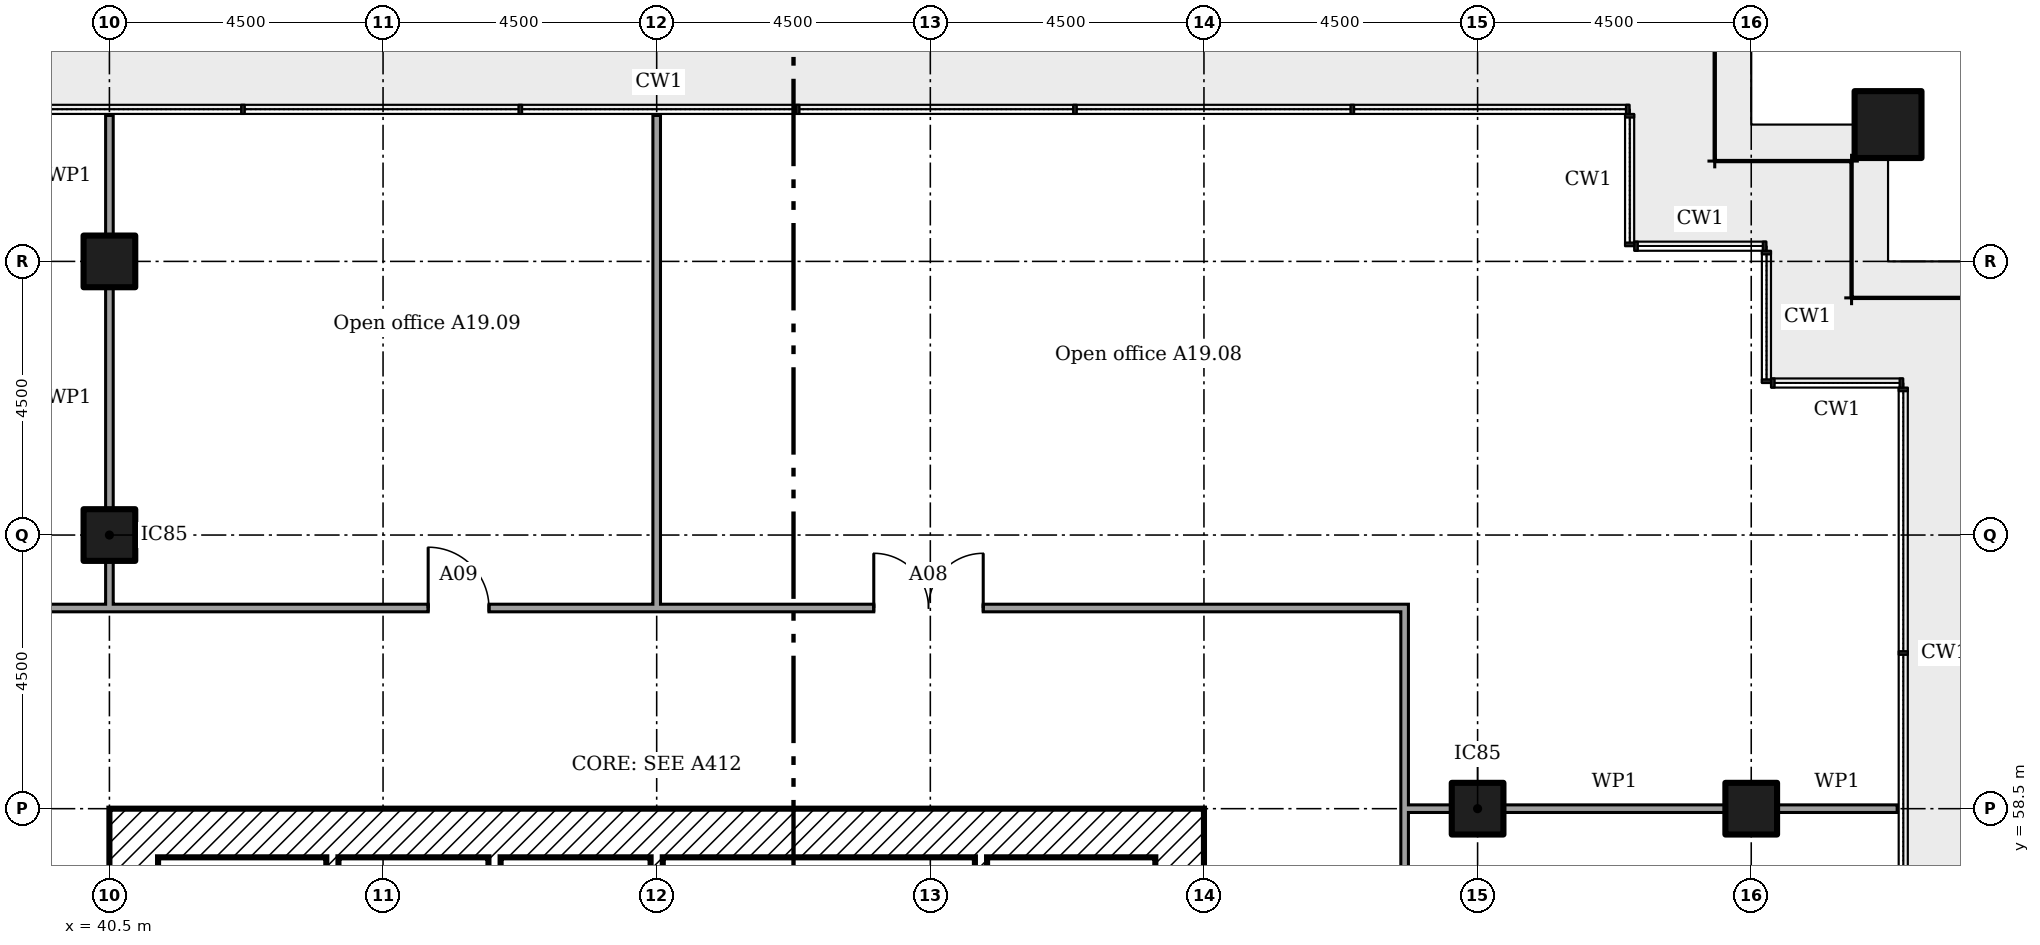
"""IFC4 building model, lengths in metres.
Left out: names, types, materials, properties, quantities, classifications, styles, units other than length and angle.
Written with IfcOpenShell. Run it as: python <this file> out.ifc"""

import sys

from ifc_helpers import new_model, si_unit, direction, frame, frame_2d, origin, origin_2d, place, context, subcontext, project, spatial, rectangle, extrude, element, fill, save


model = new_model("IFC4")
c1 = context("Model", 3, precision=1e-05, world=origin(), true_north=direction((0.0, 1.0)))
c2 = subcontext(c1, "Body", "Model", "MODEL_VIEW")
j1 = project(units=[si_unit("LENGTHUNIT", "METRE"), si_unit("PLANEANGLEUNIT", "RADIAN")], contexts=[c1])
p1 = place(None, origin())
s1 = spatial("IfcSite", under=j1, at=p1, CompositionType="ELEMENT")
p2 = place(p1, origin())
s2 = spatial("IfcBuilding", under=s1, at=p2, CompositionType="ELEMENT")
p3 = place(p2, frame((0.0, 0.0, 79.8)))
s3 = spatial("IfcBuildingStorey", under=s2, at=p3, CompositionType="ELEMENT", Elevation=79.8)
p4 = place(p3, frame((69.75, 69.75, 0.0)))
e1 = element("IfcColumn", 1, at=p4, inside=s3, PredefinedType="COLUMN", context=c2, shape_type="SweptSolid", body=[
    extrude(rectangle(XDim=1.1, YDim=1.1, at=origin_2d()), origin(), (0.0, 0.0, 1.0), 3.6),
])
for number, where in (
    (2, (40.5, 63.0, 0.0)),
    (3, (40.5, 67.5, 0.0)),
    (4, (63.0, 58.5, 0.0)),
    (5, (67.5, 58.5, 0.0)),
):
    element("IfcColumn", number, at=place(p3, frame(where)), inside=s3, PredefinedType="COLUMN", context=c2, shape_type="SweptSolid", body=[
        extrude(rectangle(XDim=0.85, YDim=0.85, at=origin_2d()), origin(), (0.0, 0.0, 1.0), 3.6),
    ])
p5 = place(p3, frame((58.1, 40.5, 0.0), z_axis=(0.0, 0.0, 1.0), x_axis=(0.0, 1.0, 0.0)))
e6 = element("IfcWall", 6, at=p5, inside=s3, PredefinedType="SHEAR", context=c2, shape_type="SweptSolid", body=[
    extrude(rectangle(XDim=18.0, YDim=0.8, at=frame_2d((9.0, 0.0))), origin(), (0.0, 0.0, 1.0), 3.35),
])
p6 = place(p5, frame((13.15, 0.0, 0.0)))
e7 = element("IfcOpeningElement", 7, at=p6, cuts=e6, PredefinedType="OPENING", context=c2, shape_type="SweptSolid", body=[
    extrude(rectangle(XDim=1.2, YDim=2.1, at=frame_2d((0.6, 1.05))), frame((0.0, 0.41, 0.0), z_axis=(0.0, -1.0, 0.0), x_axis=(1.0, 0.0, 0.0)), (0.0, 0.0, 1.0), 0.82),
])
p7 = place(p5, frame((3.9, 0.0, 0.0)))
e8 = element("IfcOpeningElement", 8, at=p7, cuts=e6, PredefinedType="OPENING", context=c2, shape_type="SweptSolid", body=[
    extrude(rectangle(XDim=1.8, YDim=2.1, at=frame_2d((0.9, 1.05))), frame((0.0, 0.41, 0.0), z_axis=(0.0, -1.0, 0.0), x_axis=(1.0, 0.0, 0.0)), (0.0, 0.0, 1.0), 0.82),
])
p8 = place(p5, frame((11.525, 0.0, 0.0)))
e9 = element("IfcOpeningElement", 9, at=p8, cuts=e6, PredefinedType="OPENING", context=c2, shape_type="SweptSolid", body=[
    extrude(rectangle(XDim=1.0, YDim=2.1, at=frame_2d((0.5, 1.05))), frame((0.0, 0.41, 0.0), z_axis=(0.0, -1.0, 0.0), x_axis=(1.0, 0.0, 0.0)), (0.0, 0.0, 1.0), 0.82),
])
p9 = place(p3, frame((41.3, 58.1, 0.0)))
e10 = element("IfcWall", 10, at=p9, inside=s3, PredefinedType="SHEAR", context=c2, shape_type="SweptSolid", body=[
    extrude(rectangle(XDim=16.4, YDim=0.8, at=frame_2d((8.2, 0.0))), origin(), (0.0, 0.0, 1.0), 3.35),
])
p10 = place(p3, frame((40.9, 40.5, 0.0), z_axis=(0.0, 0.0, 1.0), x_axis=(0.0, 1.0, 0.0)))
e11 = element("IfcWall", 11, at=p10, inside=s3, PredefinedType="SHEAR", context=c2, shape_type="SweptSolid", body=[
    extrude(rectangle(XDim=18.0, YDim=0.8, at=frame_2d((9.0, 0.0))), origin(), (0.0, 0.0, 1.0), 3.35),
])
p11 = place(p10, frame((3.65, 0.0, 0.0)))
e12 = element("IfcOpeningElement", 12, at=p11, cuts=e11, PredefinedType="OPENING", context=c2, shape_type="SweptSolid", body=[
    extrude(rectangle(XDim=1.2, YDim=2.1, at=frame_2d((0.6, 1.05))), frame((0.0, 0.41, 0.0), z_axis=(0.0, -1.0, 0.0), x_axis=(1.0, 0.0, 0.0)), (0.0, 0.0, 1.0), 0.82),
])
p12 = place(p10, frame((5.475, 0.0, 0.0)))
e13 = element("IfcOpeningElement", 13, at=p12, cuts=e11, PredefinedType="OPENING", context=c2, shape_type="SweptSolid", body=[
    extrude(rectangle(XDim=1.0, YDim=2.1, at=frame_2d((0.5, 1.05))), frame((0.0, 0.41, 0.0), z_axis=(0.0, -1.0, 0.0), x_axis=(1.0, 0.0, 0.0)), (0.0, 0.0, 1.0), 0.82),
])
p13 = place(p10, frame((12.3, 0.0, 0.0)))
e14 = element("IfcOpeningElement", 14, at=p13, cuts=e11, PredefinedType="OPENING", context=c2, shape_type="SweptSolid", body=[
    extrude(rectangle(XDim=1.0, YDim=2.1, at=frame_2d((0.5, 1.05))), frame((0.0, 0.41, 0.0), z_axis=(0.0, -1.0, 0.0), x_axis=(1.0, 0.0, 0.0)), (0.0, 0.0, 1.0), 0.82),
])
p14 = place(p3, frame((44.167, 57.7, 0.0), z_axis=(0.0, 0.0, 1.0), x_axis=(0.0, -1.0, 0.0)))
e15 = element("IfcWall", 15, at=p14, inside=s3, PredefinedType="SHEAR", context=c2, shape_type="SweptSolid", body=[
    extrude(rectangle(XDim=3.3, YDim=0.2, at=frame_2d((1.65, 0.0))), origin(), (0.0, 0.0, 1.0), 3.35),
])
p15 = place(p3, frame((46.833, 57.7, 0.0), z_axis=(0.0, 0.0, 1.0), x_axis=(0.0, -1.0, 0.0)))
e16 = element("IfcWall", 16, at=p15, inside=s3, PredefinedType="SHEAR", context=c2, shape_type="SweptSolid", body=[
    extrude(rectangle(XDim=4.4, YDim=0.2, at=frame_2d((2.2, 0.0))), origin(), (0.0, 0.0, 1.0), 3.35),
])
for number, where, z_axis, x_axis in (
    (17, (49.5, 57.7, 0.0), (0.0, 0.0, 1.0), (0.0, -1.0, 0.0)),
    (18, (54.833, 57.7, 0.0), (0.0, 0.0, 1.0), (0.0, -1.0, 0.0)),
):
    element("IfcWall", number, at=place(p3, frame(where, z_axis=z_axis, x_axis=x_axis)), inside=s3, PredefinedType="SHEAR", context=c2, shape_type="SweptSolid", body=[
        extrude(rectangle(XDim=2.5, YDim=0.2, at=frame_2d((1.25, 0.0))), origin(), (0.0, 0.0, 1.0), 3.35),
    ])
p16 = place(p3, frame((61.8, 58.5, 0.0)))
e19 = element("IfcWall", 19, at=p16, inside=s3, PredefinedType="PARTITIONING", context=c2, shape_type="SweptSolid", body=[
    extrude(rectangle(XDim=0.775, YDim=0.125, at=frame_2d((0.387, 0.0))), origin(), (0.0, 0.0, 1.0), 2.676),
])
p17 = place(p3, frame((63.425, 58.5, 0.0)))
e20 = element("IfcWall", 20, at=p17, inside=s3, PredefinedType="PARTITIONING", context=c2, shape_type="SweptSolid", body=[
    extrude(rectangle(XDim=3.65, YDim=0.125, at=frame_2d((1.825, 0.0))), origin(), (0.0, 0.0, 1.0), 2.676),
])
p18 = place(p3, frame((67.925, 58.5, 0.0)))
e21 = element("IfcWall", 21, at=p18, inside=s3, PredefinedType="PARTITIONING", context=c2, shape_type="SweptSolid", body=[
    extrude(rectangle(XDim=1.975, YDim=0.125, at=frame_2d((0.987, 0.0))), origin(), (0.0, 0.0, 1.0), 2.676),
])
p19 = place(p3, frame((38.637, 61.8, 0.0)))
e22 = element("IfcWall", 22, at=p19, inside=s3, PredefinedType="PARTITIONING", context=c2, shape_type="SweptSolid", body=[
    extrude(rectangle(XDim=23.225, YDim=0.125, at=frame_2d((11.613, 0.0))), origin(), (0.0, 0.0, 1.0), 3.45),
])
p20 = place(p19, frame((14.433, 0.0, 0.0)))
e23 = element("IfcOpeningElement", 23, at=p20, cuts=e22, PredefinedType="OPENING", context=c2, shape_type="SweptSolid", body=[
    extrude(rectangle(XDim=1.8, YDim=2.1, at=frame_2d((0.9, 1.05))), frame((0.0, 0.073, 0.0), z_axis=(0.0, -1.0, 0.0), x_axis=(1.0, 0.0, 0.0)), (0.0, 0.0, 1.0), 0.145),
])
p21 = place(p19, frame((7.104, 0.0, 0.0)))
e24 = element("IfcOpeningElement", 24, at=p21, cuts=e22, PredefinedType="OPENING", context=c2, shape_type="SweptSolid", body=[
    extrude(rectangle(XDim=1.0, YDim=2.1, at=frame_2d((0.5, 1.05))), frame((0.0, 0.073, 0.0), z_axis=(0.0, -1.0, 0.0), x_axis=(1.0, 0.0, 0.0)), (0.0, 0.0, 1.0), 0.145),
])
p22 = place(p3, frame((40.5, 61.8, 0.0), z_axis=(0.0, 0.0, 1.0), x_axis=(0.0, 1.0, 0.0)))
e25 = element("IfcWall", 25, at=p22, inside=s3, PredefinedType="PARTITIONING", context=c2, shape_type="SweptSolid", body=[
    extrude(rectangle(XDim=0.775, YDim=0.125, at=frame_2d((0.387, 0.0))), origin(), (0.0, 0.0, 1.0), 2.676),
])
p23 = place(p3, frame((40.5, 63.425, 0.0), z_axis=(0.0, 0.0, 1.0), x_axis=(0.0, 1.0, 0.0)))
e26 = element("IfcWall", 26, at=p23, inside=s3, PredefinedType="PARTITIONING", context=c2, shape_type="SweptSolid", body=[
    extrude(rectangle(XDim=3.65, YDim=0.125, at=frame_2d((1.825, 0.0))), origin(), (0.0, 0.0, 1.0), 2.676),
])
p24 = place(p3, frame((40.5, 67.925, 0.0), z_axis=(0.0, 0.0, 1.0), x_axis=(0.0, 1.0, 0.0)))
e27 = element("IfcWall", 27, at=p24, inside=s3, PredefinedType="PARTITIONING", context=c2, shape_type="SweptSolid", body=[
    extrude(rectangle(XDim=1.975, YDim=0.125, at=frame_2d((0.987, 0.0))), origin(), (0.0, 0.0, 1.0), 2.676),
])
p25 = place(p3, frame((49.5, 61.8, 0.0), z_axis=(0.0, 0.0, 1.0), x_axis=(0.0, 1.0, 0.0)))
e28 = element("IfcWall", 28, at=p25, inside=s3, PredefinedType="PARTITIONING", context=c2, shape_type="SweptSolid", body=[
    extrude(rectangle(XDim=8.1, YDim=0.125, at=frame_2d((4.05, 0.0))), origin(), (0.0, 0.0, 1.0), 2.766),
])
p26 = place(p3, frame((61.8, 37.262, 0.0), z_axis=(0.0, 0.0, 1.0), x_axis=(0.0, 1.0, 0.0)))
e29 = element("IfcWall", 29, at=p26, inside=s3, PredefinedType="PARTITIONING", context=c2, shape_type="SweptSolid", body=[
    extrude(rectangle(XDim=24.475, YDim=0.125, at=frame_2d((12.238, 0.0))), origin(), (0.0, 0.0, 1.0), 3.45),
])
p27 = place(p26, frame((4.532, 0.0, 0.0)))
e30 = element("IfcOpeningElement", 30, at=p27, cuts=e29, PredefinedType="OPENING", context=c2, shape_type="SweptSolid", body=[
    extrude(rectangle(XDim=1.0, YDim=2.1, at=frame_2d((0.5, 1.05))), frame((0.0, 0.073, 0.0), z_axis=(0.0, -1.0, 0.0), x_axis=(1.0, 0.0, 0.0)), (0.0, 0.0, 1.0), 0.145),
])
p28 = place(p26, frame((12.979, 0.0, 0.0)))
e31 = element("IfcOpeningElement", 31, at=p28, cuts=e29, PredefinedType="OPENING", context=c2, shape_type="SweptSolid", body=[
    extrude(rectangle(XDim=1.0, YDim=2.1, at=frame_2d((0.5, 1.05))), frame((0.0, 0.073, 0.0), z_axis=(0.0, -1.0, 0.0), x_axis=(1.0, 0.0, 0.0)), (0.0, 0.0, 1.0), 0.145),
])
p29 = place(p26, frame((18.488, 0.0, 0.0)))
e32 = element("IfcOpeningElement", 32, at=p29, cuts=e29, PredefinedType="OPENING", context=c2, shape_type="SweptSolid", body=[
    extrude(rectangle(XDim=1.0, YDim=2.1, at=frame_2d((0.5, 1.05))), frame((0.0, 0.073, 0.0), z_axis=(0.0, -1.0, 0.0), x_axis=(1.0, 0.0, 0.0)), (0.0, 0.0, 1.0), 0.145),
])
p30 = place(p20, origin())
e33 = element("IfcDoor", 33, at=p30, inside=s3, OperationType="DOUBLE_DOOR_SINGLE_SWING", PredefinedType="DOOR", context=c2, shape_type="SweptSolid", body=[
    extrude(rectangle(XDim=1.8, YDim=2.1, at=frame_2d((0.9, 1.05))), frame((0.0, 0.025, 0.0), z_axis=(0.0, -1.0, 0.0), x_axis=(1.0, 0.0, 0.0)), (0.0, 0.0, 1.0), 0.05),
])
fill(e23, e33)
p31 = place(p21, origin())
e34 = element("IfcDoor", 34, at=p31, inside=s3, OperationType="SINGLE_SWING_RIGHT", PredefinedType="DOOR", context=c2, shape_type="SweptSolid", body=[
    extrude(rectangle(XDim=1.0, YDim=2.1, at=frame_2d((0.5, 1.05))), frame((0.0, 0.025, 0.0), z_axis=(0.0, -1.0, 0.0), x_axis=(1.0, 0.0, 0.0)), (0.0, 0.0, 1.0), 0.05),
])
fill(e24, e34)
save(model, sys.argv[1])
